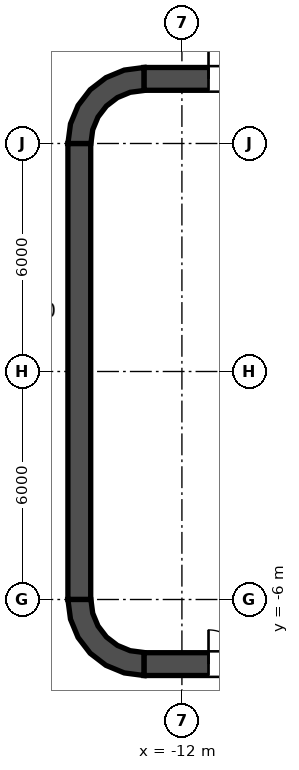
"""IFC4 building model, lengths in metres.
Left out: names, types, materials, properties, quantities, classifications, styles, units other than length and angle.
Written with IfcOpenShell. Run it as: python <this file> out.ifc"""

import sys

from ifc_helpers import new_model, si_unit, direction, frame, frame_2d, origin, place, context, subcontext, project, spatial, polyline, rectangle, outline, extrude, element, fill, save


model = new_model("IFC4")
c1 = context("Model", 3, precision=1e-05, world=origin(), true_north=direction((0.0, 1.0)))
c2 = subcontext(c1, "Body", "Model", "MODEL_VIEW")
j1 = project(units=[si_unit("LENGTHUNIT", "METRE"), si_unit("PLANEANGLEUNIT", "RADIAN")], contexts=[c1])
p1 = place(None, origin())
s1 = spatial("IfcSite", under=j1, at=p1, CompositionType="ELEMENT")
p2 = place(p1, origin())
s2 = spatial("IfcBuilding", under=s1, at=p2, CompositionType="ELEMENT")
p3 = place(p2, frame((0.0, 0.0, 96.6)))
s3 = spatial("IfcBuildingStorey", under=s2, at=p3, CompositionType="ELEMENT", Elevation=96.6)
p4 = place(p3, frame((-13.0, 7.7, 0.0), z_axis=(0.0, 0.0, 1.0), x_axis=(1.0, 0.0, 0.0)))
e1 = element("IfcWall", 1, at=p4, inside=s3, PredefinedType="SHEAR", context=c2, shape_type="SweptSolid", body=[
    extrude(rectangle(XDim=26.0, YDim=0.6, at=frame_2d((13.0, 0.0))), origin(), (0.0, 0.0, 1.0), 5.4),
])
p5 = place(p4, frame((1.7, 0.0, 0.0)))
e2 = element("IfcOpeningElement", 2, at=p5, cuts=e1, PredefinedType="OPENING", context=c2, shape_type="SweptSolid", body=[
    extrude(rectangle(XDim=1.8, YDim=2.1, at=frame_2d((0.9, 1.05))), frame((0.0, 0.3, 0.0), z_axis=(0.0, -1.0, 0.0), x_axis=(1.0, 0.0, 0.0)), (0.0, 0.0, 1.0), 0.6),
])
p6 = place(p4, frame((22.5, 0.0, 0.0)))
e3 = element("IfcOpeningElement", 3, at=p6, cuts=e1, PredefinedType="OPENING", context=c2, shape_type="SweptSolid", body=[
    extrude(rectangle(XDim=1.8, YDim=2.1, at=frame_2d((0.9, 1.05))), frame((0.0, 0.3, 0.0), z_axis=(0.0, -1.0, 0.0), x_axis=(1.0, 0.0, 0.0)), (0.0, 0.0, 1.0), 0.6),
])
p7 = place(p3, frame((-13.0, -7.7, 0.0), z_axis=(0.0, 0.0, 1.0), x_axis=(1.0, 0.0, 0.0)))
e4 = element("IfcWall", 4, at=p7, inside=s3, PredefinedType="SHEAR", context=c2, shape_type="SweptSolid", body=[
    extrude(rectangle(XDim=26.0, YDim=0.6, at=frame_2d((13.0, 0.0))), origin(), (0.0, 0.0, 1.0), 5.4),
])
p8 = place(p7, frame((1.7, 0.0, 0.0)))
e5 = element("IfcOpeningElement", 5, at=p8, cuts=e4, PredefinedType="OPENING", context=c2, shape_type="SweptSolid", body=[
    extrude(rectangle(XDim=1.8, YDim=2.1, at=frame_2d((0.9, 1.05))), frame((0.0, 0.3, 0.0), z_axis=(0.0, -1.0, 0.0), x_axis=(1.0, 0.0, 0.0)), (0.0, 0.0, 1.0), 0.6),
])
p9 = place(p7, frame((22.5, 0.0, 0.0)))
e6 = element("IfcOpeningElement", 6, at=p9, cuts=e4, PredefinedType="OPENING", context=c2, shape_type="SweptSolid", body=[
    extrude(rectangle(XDim=1.8, YDim=2.1, at=frame_2d((0.9, 1.05))), frame((0.0, 0.3, 0.0), z_axis=(0.0, -1.0, 0.0), x_axis=(1.0, 0.0, 0.0)), (0.0, 0.0, 1.0), 0.6),
])
p10 = place(p3, frame((-14.7, -6.0, 0.0), z_axis=(0.0, 0.0, 1.0), x_axis=(0.0, 1.0, 0.0)))
e7 = element("IfcWall", 7, at=p10, inside=s3, PredefinedType="SHEAR", context=c2, shape_type="SweptSolid", body=[
    extrude(rectangle(XDim=12.0, YDim=0.6, at=frame_2d((6.0, 0.0))), origin(), (0.0, 0.0, 1.0), 5.4),
])
p11 = place(p3, origin())
e8 = element("IfcWall", 8, at=p11, inside=s3, PredefinedType="SHEAR", context=c2, shape_type="SweptSolid", body=[
    extrude(outline(polyline([(-15.0, 6.0), (-14.395, 6.0), (-14.347, 6.361), (-14.208, 6.698), (-13.986, 6.986), (-13.698, 7.208), (-13.361, 7.347), (-13.0, 7.395), (-13.0, 8.0), (-13.518, 7.932), (-14.0, 7.732), (-14.414, 7.414), (-14.732, 7.0), (-14.932, 6.518), (-15.0, 6.0)])), origin(), (0.0, 0.0, 1.0), 5.4),
])
e9 = element("IfcWall", 9, at=p11, inside=s3, PredefinedType="SHEAR", context=c2, shape_type="SweptSolid", body=[
    extrude(outline(polyline([(-13.0, -8.0), (-13.0, -7.395), (-13.361, -7.347), (-13.698, -7.208), (-13.986, -6.986), (-14.208, -6.698), (-14.347, -6.361), (-14.395, -6.0), (-15.0, -6.0), (-14.932, -6.518), (-14.732, -7.0), (-14.414, -7.414), (-14.0, -7.732), (-13.518, -7.932), (-13.0, -8.0)])), origin(), (0.0, 0.0, 1.0), 5.4),
])
p12 = place(p3, frame((-11.8, -7.4, 0.0), z_axis=(0.0, 0.0, 1.0), x_axis=(0.0, 1.0, 0.0)))
e10 = element("IfcWall", 10, at=p12, inside=s3, PredefinedType="SOLIDWALL", context=c2, shape_type="SweptSolid", body=[
    extrude(rectangle(XDim=14.8, YDim=0.4, at=frame_2d((7.4, 0.0))), origin(), (0.0, 0.0, 1.0), 5.25),
])
p13 = place(p12, frame((13.552, 0.0, 0.0)))
e11 = element("IfcOpeningElement", 11, at=p13, cuts=e10, PredefinedType="OPENING", context=c2, shape_type="SweptSolid", body=[
    extrude(rectangle(XDim=0.9, YDim=2.1, at=frame_2d((0.45, 1.05))), frame((0.0, 0.2, 0.0), z_axis=(0.0, -1.0, 0.0), x_axis=(1.0, 0.0, 0.0)), (0.0, 0.0, 1.0), 0.4),
])
p14 = place(p12, frame((0.347, 0.0, 0.0)))
e12 = element("IfcOpeningElement", 12, at=p14, cuts=e10, PredefinedType="OPENING", context=c2, shape_type="SweptSolid", body=[
    extrude(rectangle(XDim=0.9, YDim=2.1, at=frame_2d((0.45, 1.05))), frame((0.0, 0.2, 0.0), z_axis=(0.0, -1.0, 0.0), x_axis=(1.0, 0.0, 0.0)), (0.0, 0.0, 1.0), 0.4),
])
e13 = element("IfcWall", 13, at=p11, inside=s3, PredefinedType="SOLIDWALL", context=c2, shape_type="SweptSolid", body=[
    extrude(outline(polyline([(-12.0, -5.925), (-12.0, -5.675), (-14.15, -5.675), (-14.15, -3.025), (-12.0, -3.025), (-12.0, -2.775), (-14.15, -2.775), (-14.15, -0.125), (-12.0, -0.125), (-12.0, 0.125), (-14.15, 0.125), (-14.15, 2.775), (-12.0, 2.775), (-12.0, 3.025), (-14.15, 3.025), (-14.15, 5.675), (-12.0, 5.675), (-12.0, 5.925), (-14.15, 5.925), (-14.4, 5.925), (-14.4, 5.675), (-14.4, 3.025), (-14.4, 2.775), (-14.4, 0.125), (-14.4, -0.125), (-14.4, -2.775), (-14.4, -3.025), (-14.4, -5.675), (-14.4, -5.925), (-14.15, -5.925), (-12.0, -5.925)])), origin(), (0.0, 0.0, 1.0), 5.25),
])
p15 = place(p13, origin())
e14 = element("IfcDoor", 14, at=p15, inside=s3, OperationType="SINGLE_SWING_LEFT", PredefinedType="DOOR", context=c2, shape_type="SweptSolid", body=[
    extrude(rectangle(XDim=0.9, YDim=2.1, at=frame_2d((0.45, 1.05))), frame((0.0, 0.025, 0.0), z_axis=(0.0, -1.0, 0.0), x_axis=(1.0, 0.0, 0.0)), (0.0, 0.0, 1.0), 0.05),
])
fill(e11, e14)
p16 = place(p14, origin())
e15 = element("IfcDoor", 15, at=p16, inside=s3, OperationType="SINGLE_SWING_LEFT", PredefinedType="DOOR", context=c2, shape_type="SweptSolid", body=[
    extrude(rectangle(XDim=0.9, YDim=2.1, at=frame_2d((0.45, 1.05))), frame((0.0, 0.025, 0.0), z_axis=(0.0, -1.0, 0.0), x_axis=(1.0, 0.0, 0.0)), (0.0, 0.0, 1.0), 0.05),
])
fill(e12, e15)
p17 = place(p5, origin())
e16 = element("IfcDoor", 16, at=p17, inside=s3, OperationType="DOUBLE_DOOR_SINGLE_SWING", PredefinedType="DOOR", context=c2, shape_type="SweptSolid", body=[
    extrude(rectangle(XDim=1.8, YDim=2.1, at=frame_2d((0.9, 1.05))), frame((0.0, 0.025, 0.0), z_axis=(0.0, -1.0, 0.0), x_axis=(1.0, 0.0, 0.0)), (0.0, 0.0, 1.0), 0.05),
])
fill(e2, e16)
p18 = place(p8, origin())
e17 = element("IfcDoor", 17, at=p18, inside=s3, OperationType="DOUBLE_DOOR_SINGLE_SWING", PredefinedType="DOOR", context=c2, shape_type="SweptSolid", body=[
    extrude(rectangle(XDim=1.8, YDim=2.1, at=frame_2d((0.9, 1.05))), frame((0.0, 0.025, 0.0), z_axis=(0.0, -1.0, 0.0), x_axis=(1.0, 0.0, 0.0)), (0.0, 0.0, 1.0), 0.05),
])
fill(e5, e17)
save(model, sys.argv[1])
